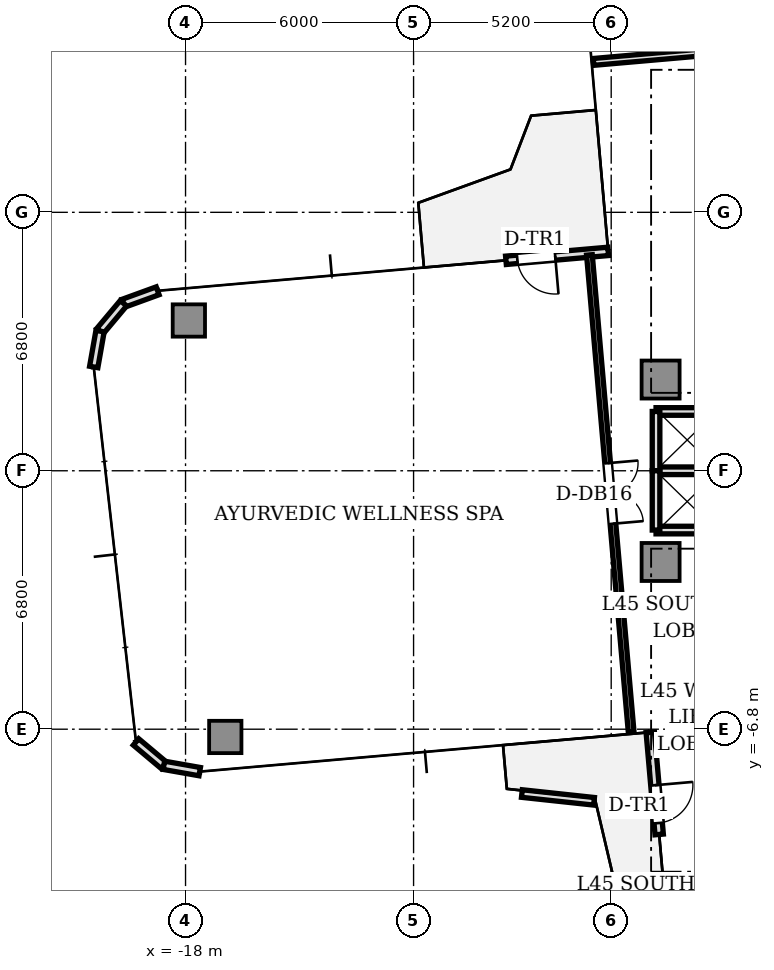
"""IFC4 building model, lengths in metres.
Left out: names, types, materials, properties, quantities, classifications, styles, units other than length and angle.
Written with IfcOpenShell. Run it as: python <this file> out.ifc"""

import sys

from ifc_helpers import new_model, si_unit, direction, frame, frame_2d, origin, origin_2d, place, context, subcontext, project, spatial, rectangle, extrude, source, transform, mapped, element, fill, save


model = new_model("IFC4")
c1 = context("Model", 3, precision=1e-05, world=origin(), true_north=direction((0.0, 1.0)))
c2 = subcontext(c1, "Body", "Model", "MODEL_VIEW")
j1 = project(units=[si_unit("LENGTHUNIT", "METRE"), si_unit("PLANEANGLEUNIT", "RADIAN")], contexts=[c1])
p1 = place(None, origin())
s1 = spatial("IfcSite", under=j1, at=p1, CompositionType="ELEMENT")
p2 = place(p1, origin())
s2 = spatial("IfcBuilding", under=s1, at=p2, CompositionType="ELEMENT")
p3 = place(p2, frame((0.0, 0.0, 164.0)))
s3 = spatial("IfcBuildingStorey", under=s2, at=p3, CompositionType="ELEMENT", Elevation=164.0)
m1 = source(origin(), c2, "Body", "SweptSolid", [
    extrude(rectangle(XDim=1.0, YDim=1.0, at=origin_2d()), origin(), (0.0, 0.0, 1.0), 3.11),
])
for number, where, z_axis, x_axis in (
    (1, (-5.5, 2.4, 0.0), (0.0, 0.0, 1.0), (1.0, 0.0, 0.0)),
    (2, (-5.5, -2.4, 0.0), (0.0, 0.0, 1.0), (1.0, 0.0, 0.0)),
):
    element("IfcColumn", number, at=place(p3, frame(where, z_axis=z_axis, x_axis=x_axis)), inside=s3, PredefinedType="COLUMN", context=c2, shape_type="MappedRepresentation", body=[
        mapped(m1, transform((0.0, 0.0, 0.0), scale=1.0)),
    ])
m2 = source(origin(), c2, "Body", "SweptSolid", [
    extrude(rectangle(XDim=0.85, YDim=0.85, at=origin_2d()), origin(), (0.0, 0.0, 1.0), 3.11),
])
for number, where, z_axis, x_axis in (
    (3, (-17.913, 3.954, 0.0), (0.0, 0.0, 1.0), (1.0, 0.0, 0.0)),
    (4, (-16.954, -7.004, 0.0), (0.0, 0.0, 1.0), (1.0, 0.0, 0.0)),
):
    element("IfcColumn", number, at=place(p3, frame(where, z_axis=z_axis, x_axis=x_axis)), inside=s3, PredefinedType="COLUMN", context=c2, shape_type="MappedRepresentation", body=[
        mapped(m2, transform((0.0, 0.0, 0.0), scale=1.0)),
    ])
p4 = place(p3, frame((-6.879, 5.772, 0.0), z_axis=(0.0, 0.0, 1.0), x_axis=(-0.996193619346, -0.087168071984, 0.0)))
e5 = element("IfcWall", 5, at=p4, inside=s3, PredefinedType="STANDARD", context=c2, shape_type="SweptSolid", body=[
    extrude(rectangle(XDim=2.7, YDim=0.22, at=frame_2d((1.35, 0.0))), origin(), (0.0, 0.0, 1.0), 3.11),
])
p5 = place(p4, frame((1.4, 0.0, 0.0)))
e6 = element("IfcOpeningElement", 6, at=p5, cuts=e5, PredefinedType="OPENING", context=c2, shape_type="SweptSolid", body=[
    extrude(rectangle(XDim=1.0, YDim=2.2, at=frame_2d((0.5, 1.1))), frame((0.0, 0.12, 0.0), z_axis=(0.0, -1.0, 0.0), x_axis=(1.0, 0.0, 0.0)), (0.0, 0.0, 1.0), 0.24),
])
p6 = place(p3, frame((-18.734, 4.735, 0.0), z_axis=(0.0, 0.0, 1.0), x_axis=(-0.939741306239, -0.34188635151, 0.0)))
e7 = element("IfcWall", 7, at=p6, inside=s3, PredefinedType="STANDARD", context=c2, shape_type="SweptSolid", body=[
    extrude(rectangle(XDim=0.958, YDim=0.22, at=frame_2d((0.479, 0.0))), origin(), (0.0, 0.0, 1.0), 3.11),
])
for number, where, z_axis, x_axis in (
    (8, (-19.634, 4.408, 0.0), (0.0, 0.0, 1.0), (-0.643, -0.766, 0.0)),
    (9, (-20.25, 3.674, 0.0), (0.0, 0.0, 1.0), (-0.174, -0.985, 0.0)),
):
    element("IfcWall", number, at=place(p3, frame(where, z_axis=z_axis, x_axis=x_axis)), inside=s3, PredefinedType="STANDARD", context=c2, shape_type="SweptSolid", body=[
        extrude(rectangle(XDim=0.958, YDim=0.22, at=frame_2d((0.479, 0.0))), origin(), (0.0, 0.0, 1.0), 3.11),
    ])
p7 = place(p3, frame((-19.304, -7.135, 0.0), z_axis=(0.0, 0.0, 1.0), x_axis=(0.766001159887, -0.642839189107, 0.0)))
e10 = element("IfcWall", 10, at=p7, inside=s3, PredefinedType="STANDARD", context=c2, shape_type="SweptSolid", body=[
    extrude(rectangle(XDim=0.958, YDim=0.22, at=frame_2d((0.479, 0.0))), origin(), (0.0, 0.0, 1.0), 3.11),
])
p8 = place(p3, frame((-18.57, -7.75, 0.0), z_axis=(0.0, 0.0, 1.0), x_axis=(0.984770724397, -0.173858046606, 0.0)))
e11 = element("IfcWall", 11, at=p8, inside=s3, PredefinedType="STANDARD", context=c2, shape_type="SweptSolid", body=[
    extrude(rectangle(XDim=0.958, YDim=0.22, at=frame_2d((0.479, 0.0))), origin(), (0.0, 0.0, 1.0), 3.11),
])
p9 = place(p3, frame((-5.772, -6.879, 0.0), z_axis=(0.0, 0.0, 1.0), x_axis=(0.087168071984, -0.996193619346, 0.0)))
e12 = element("IfcWall", 12, at=p9, inside=s3, PredefinedType="STANDARD", context=c2, shape_type="SweptSolid", body=[
    extrude(rectangle(XDim=2.7, YDim=0.22, at=frame_2d((1.35, 0.0))), origin(), (0.0, 0.0, 1.0), 3.11),
])
p10 = place(p9, frame((1.4, 0.0, 0.0)))
e13 = element("IfcOpeningElement", 13, at=p10, cuts=e12, PredefinedType="OPENING", context=c2, shape_type="SweptSolid", body=[
    extrude(rectangle(XDim=1.0, YDim=2.2, at=frame_2d((0.5, 1.1))), frame((0.0, 0.12, 0.0), z_axis=(0.0, -1.0, 0.0), x_axis=(1.0, 0.0, 0.0)), (0.0, 0.0, 1.0), 0.24),
])
p11 = place(p3, frame((-9.15, -8.493, 0.0), z_axis=(0.0, 0.0, 1.0), x_axis=(0.994281055995, -0.106795045248, 0.0)))
e14 = element("IfcWall", 14, at=p11, inside=s3, PredefinedType="PARAPET", context=c2, shape_type="SweptSolid", body=[
    extrude(rectangle(XDim=1.909, YDim=0.2, at=frame_2d((0.955, 0.0))), origin(), (0.0, 0.0, 1.0), 0.65),
])
for number, where, z_axis, x_axis in (
    (15, (-5.62, 1.56, 0.0), (0.0, 0.0, 1.0), (1.0, 0.0, 0.0)),
    (16, (-5.62, -1.56, 0.0), (0.0, 0.0, 1.0), (1.0, 0.0, 0.0)),
    (17, (-5.62, 0.0, 0.0), (0.0, 0.0, 1.0), (1.0, 0.0, 0.0)),
):
    element("IfcWall", number, at=place(p3, frame(where, z_axis=z_axis, x_axis=x_axis)), inside=s3, PredefinedType="SOLIDWALL", context=c2, shape_type="SweptSolid", body=[
        extrude(rectangle(XDim=1.64, YDim=0.2, at=frame_2d((0.82, 0.0))), origin(), (0.0, 0.0, 1.0), 2.66),
    ])
for number, where, z_axis, x_axis in (
    (18, (-5.62, 0.0, 0.0), (0.0, 0.0, 1.0), (0.0, 1.0, 0.0)),
    (19, (-5.62, -1.56, 0.0), (0.0, 0.0, 1.0), (0.0, 1.0, 0.0)),
):
    element("IfcWall", number, at=place(p3, frame(where, z_axis=z_axis, x_axis=x_axis)), inside=s3, PredefinedType="SOLIDWALL", context=c2, shape_type="SweptSolid", body=[
        extrude(rectangle(XDim=1.56, YDim=0.2, at=frame_2d((0.78, 0.0))), origin(), (0.0, 0.0, 1.0), 2.66),
    ])
p12 = place(p3, frame((3.095, 11.664, 0.0), z_axis=(0.0, 0.0, 1.0), x_axis=(-0.996196061386, -0.087140158824, 0.0)))
e20 = element("IfcWall", 20, at=p12, inside=s3, PredefinedType="PARTITIONING", context=c2, shape_type="SweptSolid", body=[
    extrude(rectangle(XDim=10.4, YDim=0.18, at=frame_2d((5.2, 0.0))), origin(), (0.0, 0.0, 1.0), 2.66),
])
p13 = place(p3, frame((-7.373, 5.679, 0.0), z_axis=(0.0, 0.0, 1.0), x_axis=(0.087154691724, -0.996194790044, 0.0)))
e21 = element("IfcWall", 21, at=p13, inside=s3, PredefinedType="PARTITIONING", context=c2, shape_type="SweptSolid", body=[
    extrude(rectangle(XDim=12.6, YDim=0.15, at=frame_2d((6.3, 0.0))), origin(), (0.0, 0.0, 1.0), 2.66),
])
p14 = place(p13, frame((5.5, 0.0, 0.0)))
e22 = element("IfcOpeningElement", 22, at=p14, cuts=e21, PredefinedType="OPENING", context=c2, shape_type="SweptSolid", body=[
    extrude(rectangle(XDim=1.6, YDim=2.25, at=frame_2d((0.8, 1.125))), frame((0.0, 0.085, 0.0), z_axis=(0.0, -1.0, 0.0), x_axis=(1.0, 0.0, 0.0)), (0.0, 0.0, 1.0), 0.17),
])
m3 = source(origin(), c2, "Body", "SweptSolid", [
    extrude(rectangle(XDim=1.0, YDim=0.05, at=origin_2d()), origin(), (0.0, 0.0, 1.0), 2.2),
])
p15 = place(p5, frame((0.5, 0.0, 0.0)))
e23 = element("IfcDoor", 23, at=p15, inside=s3, OperationType="SINGLE_SWING_LEFT", PredefinedType="DOOR", context=c2, shape_type="MappedRepresentation", body=[
    mapped(m3, transform((0.0, 0.0, 0.0), scale=1.0)),
])
fill(e6, e23)
p16 = place(p10, frame((0.5, 0.0, 0.0)))
e24 = element("IfcDoor", 24, at=p16, inside=s3, OperationType="SINGLE_SWING_LEFT", PredefinedType="DOOR", context=c2, shape_type="MappedRepresentation", body=[
    mapped(m3, transform((0.0, 0.0, 0.0), scale=1.0)),
])
fill(e13, e24)
m4 = source(origin(), c2, "Body", "SweptSolid", [
    extrude(rectangle(XDim=1.6, YDim=0.05, at=origin_2d()), origin(), (0.0, 0.0, 1.0), 2.25),
])
p17 = place(p14, frame((0.8, 0.0, 0.0)))
e25 = element("IfcDoor", 25, at=p17, inside=s3, OperationType="DOUBLE_DOOR_SINGLE_SWING", PredefinedType="DOOR", context=c2, shape_type="MappedRepresentation", body=[
    mapped(m4, transform((0.0, 0.0, 0.0), scale=1.0)),
])
fill(e22, e25)
save(model, sys.argv[1])
